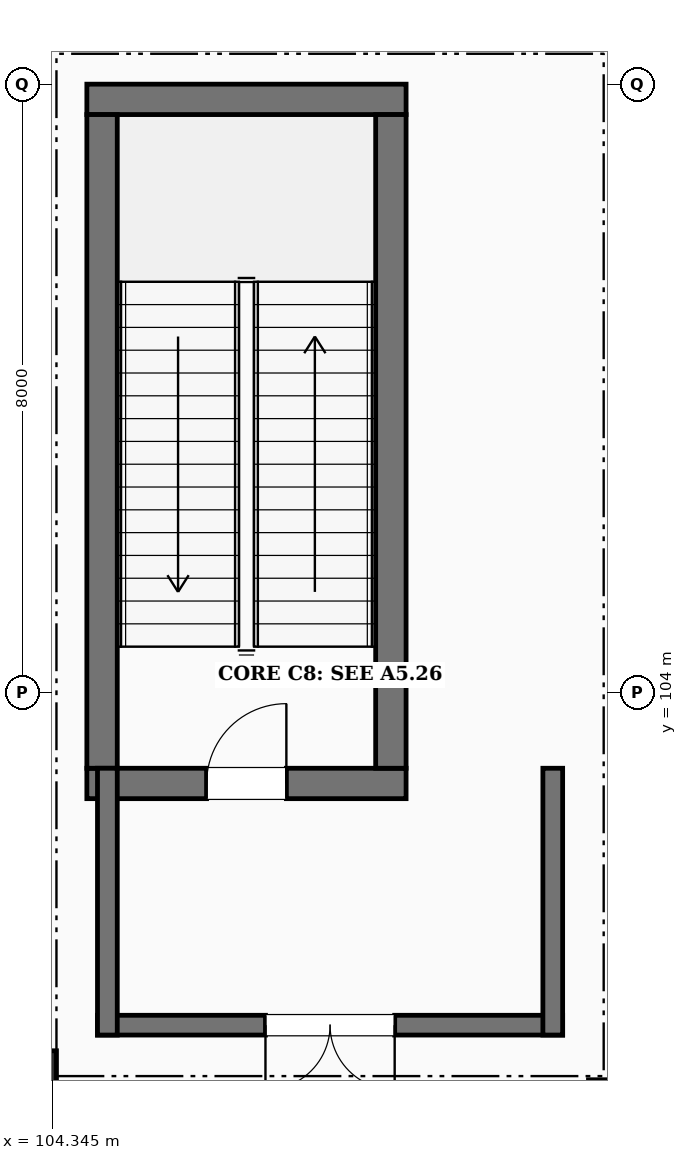
"""IFC4 building model, lengths in metres.
Left out: names, types, materials, properties, quantities, classifications, styles, units other than length and angle.
Written with IfcOpenShell. Run it as: python <this file> out.ifc"""

import sys

from ifc_helpers import new_model, si_unit, direction, frame, frame_2d, origin, origin_2d, place, context, subcontext, project, spatial, rectangle, extrude, element, fill, save


model = new_model("IFC4")
c1 = context("Model", 3, precision=1e-05, world=origin(), true_north=direction((0.0, 1.0)))
c2 = subcontext(c1, "Body", "Model", "MODEL_VIEW")
j1 = project(units=[si_unit("LENGTHUNIT", "METRE"), si_unit("PLANEANGLEUNIT", "RADIAN")], contexts=[c1])
p1 = place(None, origin())
s1 = spatial("IfcSite", under=j1, at=p1, CompositionType="ELEMENT")
p2 = place(p1, origin())
s2 = spatial("IfcBuilding", under=s1, at=p2, CompositionType="ELEMENT")
p3 = place(p2, origin())
s3 = spatial("IfcBuildingStorey", under=s2, at=p3, CompositionType="ELEMENT", Elevation=0.0)
p4 = place(p3, frame((104.0, 98.883, 0.0), z_axis=(0.0, 0.0, 1.0), x_axis=(1.0, 0.0, 0.0)))
e1 = element("IfcColumn", 1, at=p4, inside=s3, PredefinedType="COLUMN", context=c2, shape_type="SweptSolid", body=[
    extrude(rectangle(XDim=0.8, YDim=0.8, at=origin_2d()), origin(), (0.0, 0.0, 1.0), 5.4),
])
p5 = place(p3, frame((112.0, 98.502, 0.0), z_axis=(0.0, 0.0, 1.0), x_axis=(1.0, 0.0, 0.0)))
e2 = element("IfcColumn", 2, at=p5, inside=s3, PredefinedType="COLUMN", context=c2, shape_type="SweptSolid", body=[
    extrude(rectangle(XDim=1.2, YDim=0.8, at=origin_2d()), origin(), (0.0, 0.0, 1.0), 5.4),
])
p6 = place(p3, frame((104.8, 102.8, 0.0), z_axis=(0.0, 0.0, 1.0), x_axis=(1.0, 0.0, 0.0)))
e3 = element("IfcWall", 3, at=p6, inside=s3, PredefinedType="SHEAR", context=c2, shape_type="SweptSolid", body=[
    extrude(rectangle(XDim=4.2, YDim=0.4, at=frame_2d((2.1, 0.0))), origin(), (0.0, 0.0, 1.0), 5.4),
])
p7 = place(p6, frame((1.575, 0.0, 0.0)))
e4 = element("IfcOpeningElement", 4, at=p7, cuts=e3, PredefinedType="OPENING", context=c2, shape_type="SweptSolid", body=[
    extrude(rectangle(XDim=1.05, YDim=2.15, at=frame_2d((0.525, 1.075))), frame((0.0, 0.21, 0.0), z_axis=(0.0, -1.0, 0.0), x_axis=(1.0, 0.0, 0.0)), (0.0, 0.0, 1.0), 0.42),
])
p8 = place(p3, frame((104.8, 111.8, 0.0), z_axis=(0.0, 0.0, 1.0), x_axis=(1.0, 0.0, 0.0)))
e5 = element("IfcWall", 5, at=p8, inside=s3, PredefinedType="SHEAR", context=c2, shape_type="SweptSolid", body=[
    extrude(rectangle(XDim=4.2, YDim=0.4, at=frame_2d((2.1, 0.0))), origin(), (0.0, 0.0, 1.0), 5.4),
])
for number, where, z_axis, x_axis in (
    (6, (105.0, 103.0, 0.0), (0.0, 0.0, 1.0), (0.0, 1.0, 0.0)),
    (7, (108.8, 103.0, 0.0), (0.0, 0.0, 1.0), (0.0, 1.0, 0.0)),
):
    element("IfcWall", number, at=place(p3, frame(where, z_axis=z_axis, x_axis=x_axis)), inside=s3, PredefinedType="SHEAR", context=c2, shape_type="SweptSolid", body=[
        extrude(rectangle(XDim=8.6, YDim=0.4, at=frame_2d((4.3, 0.0))), origin(), (0.0, 0.0, 1.0), 5.4),
    ])
p9 = place(p3, frame((111.06, 99.62, 0.0), z_axis=(0.0, 0.0, 1.0), x_axis=(-1.0, 0.0, 0.0)))
e8 = element("IfcWall", 8, at=p9, inside=s3, PredefinedType="SHEAR", context=c2, shape_type="SweptSolid", body=[
    extrude(rectangle(XDim=6.12, YDim=0.26, at=frame_2d((3.06, 0.0))), origin(), (0.0, 0.0, 1.0), 5.4),
])
p10 = place(p9, frame((2.21, 0.0, 0.0)))
e9 = element("IfcOpeningElement", 9, at=p10, cuts=e8, PredefinedType="OPENING", context=c2, shape_type="SweptSolid", body=[
    extrude(rectangle(XDim=1.7, YDim=2.2, at=frame_2d((0.85, 1.1))), frame((0.0, 0.14, 0.0), z_axis=(0.0, -1.0, 0.0), x_axis=(1.0, 0.0, 0.0)), (0.0, 0.0, 1.0), 0.28),
])
for number, where, z_axis, x_axis in (
    (10, (105.07, 99.49, 0.0), (0.0, 0.0, 1.0), (0.0, 1.0, 0.0)),
    (11, (110.93, 99.49, 0.0), (0.0, 0.0, 1.0), (0.0, 1.0, 0.0)),
):
    element("IfcWall", number, at=place(p3, frame(where, z_axis=z_axis, x_axis=x_axis)), inside=s3, PredefinedType="SHEAR", context=c2, shape_type="SweptSolid", body=[
        extrude(rectangle(XDim=3.51, YDim=0.26, at=frame_2d((1.755, 0.0))), origin(), (0.0, 0.0, 1.0), 5.4),
    ])
p11 = place(p7, origin())
e12 = element("IfcDoor", 12, at=p11, inside=s3, OperationType="SINGLE_SWING_RIGHT", PredefinedType="DOOR", context=c2, shape_type="SweptSolid", body=[
    extrude(rectangle(XDim=1.05, YDim=2.15, at=frame_2d((0.525, 1.075))), frame((0.0, 0.025, 0.0), z_axis=(0.0, -1.0, 0.0), x_axis=(1.0, 0.0, 0.0)), (0.0, 0.0, 1.0), 0.05),
])
fill(e4, e12)
p12 = place(p10, origin())
e13 = element("IfcDoor", 13, at=p12, inside=s3, OperationType="DOUBLE_DOOR_SINGLE_SWING", PredefinedType="DOOR", context=c2, shape_type="SweptSolid", body=[
    extrude(rectangle(XDim=1.7, YDim=2.2, at=frame_2d((0.85, 1.1))), frame((0.0, 0.025, 0.0), z_axis=(0.0, -1.0, 0.0), x_axis=(1.0, 0.0, 0.0)), (0.0, 0.0, 1.0), 0.05),
])
fill(e9, e13)
save(model, sys.argv[1])
